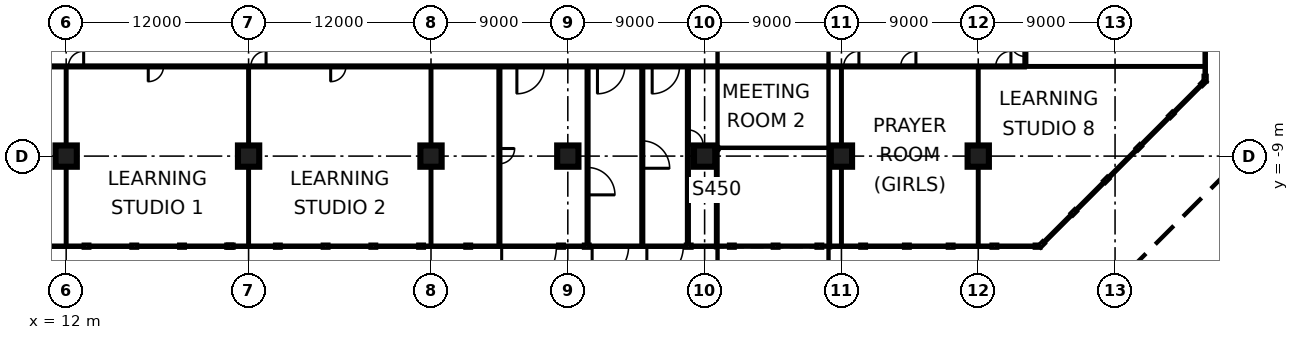
"""IFC4 building model, lengths in metres.
Left out: names, types, materials, properties, quantities, classifications, styles, units other than length and angle.
Written with IfcOpenShell. Run it as: python <this file> out.ifc"""

import sys

from ifc_helpers import new_model, si_unit, direction, frame, frame_2d, origin, origin_2d, place, context, subcontext, project, spatial, rectangle, extrude, element, fill, save


model = new_model("IFC4")
c1 = context("Model", 3, precision=1e-05, world=origin(), true_north=direction((0.0, 1.0)))
c2 = subcontext(c1, "Body", "Model", "MODEL_VIEW")
j1 = project(units=[si_unit("LENGTHUNIT", "METRE"), si_unit("PLANEANGLEUNIT", "RADIAN")], contexts=[c1])
p1 = place(None, origin())
s1 = spatial("IfcSite", under=j1, at=p1, CompositionType="ELEMENT")
p2 = place(p1, origin())
s2 = spatial("IfcBuilding", under=s1, at=p2, CompositionType="ELEMENT")
p3 = place(p2, origin())
s3 = spatial("IfcBuildingStorey", under=s2, at=p3, CompositionType="ELEMENT", Elevation=0.0)
for number, where, z_axis, x_axis in (
    (1, (12.0, -9.0, 0.0), (0.0, 0.0, 1.0), (1.0, 0.0, 0.0)),
    (2, (24.0, -9.0, 0.0), (0.0, 0.0, 1.0), (1.0, 0.0, 0.0)),
    (3, (36.0, -9.0, 0.0), (0.0, 0.0, 1.0), (1.0, 0.0, 0.0)),
    (4, (45.0, -9.0, 0.0), (0.0, 0.0, 1.0), (1.0, 0.0, 0.0)),
    (5, (54.0, -9.0, 0.0), (0.0, 0.0, 1.0), (1.0, 0.0, 0.0)),
    (6, (63.0, -9.0, 0.0), (0.0, 0.0, 1.0), (1.0, 0.0, 0.0)),
    (7, (72.0, -9.0, 0.0), (0.0, 0.0, 1.0), (1.0, 0.0, 0.0)),
):
    element("IfcColumn", number, at=place(p3, frame(where, z_axis=z_axis, x_axis=x_axis)), inside=s3, PredefinedType="COLUMN", context=c2, shape_type="SweptSolid", body=[
        extrude(rectangle(XDim=1.4, YDim=1.4, at=origin_2d()), origin(), (0.0, 0.0, 1.0), 7.2),
    ])
p4 = place(p3, frame((38.5, -14.925, 0.0), z_axis=(0.0, 0.0, 1.0), x_axis=(1.0, 0.0, 0.0)))
e8 = element("IfcWall", 8, at=p4, inside=s3, PredefinedType="SOLIDWALL", context=c2, shape_type="SweptSolid", body=[
    extrude(rectangle(XDim=6.0, YDim=0.15, at=frame_2d((3.0, 0.0))), origin(), (0.0, 0.0, 1.0), 6.8),
])
p5 = place(p4, frame((2.15, 0.0, 0.0)))
e9 = element("IfcOpeningElement", 9, at=p5, cuts=e8, PredefinedType="OPENING", context=c2, shape_type="SweptSolid", body=[
    extrude(rectangle(XDim=3.6, YDim=2.8, at=frame_2d((1.8, 1.4))), frame((0.0, 0.085, 0.0), z_axis=(0.0, -1.0, 0.0), x_axis=(1.0, 0.0, 0.0)), (0.0, 0.0, 1.0), 0.17),
])
p6 = place(p3, frame((46.3, -14.925, 0.0), z_axis=(0.0, 0.0, 1.0), x_axis=(1.0, 0.0, 0.0)))
e10 = element("IfcWall", 10, at=p6, inside=s3, PredefinedType="SOLIDWALL", context=c2, shape_type="SweptSolid", body=[
    extrude(rectangle(XDim=6.6, YDim=0.15, at=frame_2d((3.3, 0.0))), origin(), (0.0, 0.0, 1.0), 6.8),
])
p7 = place(p6, frame((0.3, 0.0, 0.0)))
e11 = element("IfcOpeningElement", 11, at=p7, cuts=e10, PredefinedType="OPENING", context=c2, shape_type="SweptSolid", body=[
    extrude(rectangle(XDim=2.4, YDim=2.4, at=frame_2d((1.2, 1.2))), frame((0.0, 0.085, 0.0), z_axis=(0.0, -1.0, 0.0), x_axis=(1.0, 0.0, 0.0)), (0.0, 0.0, 1.0), 0.17),
])
p8 = place(p6, frame((3.9, 0.0, 0.0)))
e12 = element("IfcOpeningElement", 12, at=p8, cuts=e10, PredefinedType="OPENING", context=c2, shape_type="SweptSolid", body=[
    extrude(rectangle(XDim=2.4, YDim=2.4, at=frame_2d((1.2, 1.2))), frame((0.0, 0.085, 0.0), z_axis=(0.0, -1.0, 0.0), x_axis=(1.0, 0.0, 0.0)), (0.0, 0.0, 1.0), 0.17),
])
p9 = place(p3, frame((-3.2, -3.1, 0.0), z_axis=(0.0, 0.0, 1.0), x_axis=(1.0, 0.0, 0.0)))
e13 = element("IfcWall", 13, at=p9, inside=s3, PredefinedType="PARTITIONING", context=c2, shape_type="SweptSolid", body=[
    extrude(rectangle(XDim=78.3, YDim=0.2, at=frame_2d((39.15, 0.0))), origin(), (0.0, 0.0, 1.0), 6.8),
])
p10 = place(p9, frame((70.1, 0.0, 0.0)))
e14 = element("IfcOpeningElement", 14, at=p10, cuts=e13, PredefinedType="OPENING", context=c2, shape_type="SweptSolid", body=[
    extrude(rectangle(XDim=1.0, YDim=2.1, at=frame_2d((0.5, 1.05))), frame((0.0, 0.11, 0.0), z_axis=(0.0, -1.0, 0.0), x_axis=(1.0, 0.0, 0.0)), (0.0, 0.0, 1.0), 0.22),
])
p11 = place(p9, frame((66.35, 0.0, 0.0)))
e15 = element("IfcOpeningElement", 15, at=p11, cuts=e13, PredefinedType="OPENING", context=c2, shape_type="SweptSolid", body=[
    extrude(rectangle(XDim=1.0, YDim=2.1, at=frame_2d((0.5, 1.05))), frame((0.0, 0.11, 0.0), z_axis=(0.0, -1.0, 0.0), x_axis=(1.0, 0.0, 0.0)), (0.0, 0.0, 1.0), 0.22),
])
p12 = place(p9, frame((76.35, 0.0, 0.0)))
e16 = element("IfcOpeningElement", 16, at=p12, cuts=e13, PredefinedType="OPENING", context=c2, shape_type="SweptSolid", body=[
    extrude(rectangle(XDim=1.0, YDim=2.1, at=frame_2d((0.5, 1.05))), frame((0.0, 0.11, 0.0), z_axis=(0.0, -1.0, 0.0), x_axis=(1.0, 0.0, 0.0)), (0.0, 0.0, 1.0), 0.22),
])
p13 = place(p9, frame((8.6, 0.0, 0.0)))
e17 = element("IfcOpeningElement", 17, at=p13, cuts=e13, PredefinedType="OPENING", context=c2, shape_type="SweptSolid", body=[
    extrude(rectangle(XDim=1.0, YDim=2.1, at=frame_2d((0.5, 1.05))), frame((0.0, 0.11, 0.0), z_axis=(0.0, -1.0, 0.0), x_axis=(1.0, 0.0, 0.0)), (0.0, 0.0, 1.0), 0.22),
])
p14 = place(p9, frame((3.35, 0.0, 0.0)))
e18 = element("IfcOpeningElement", 18, at=p14, cuts=e13, PredefinedType="OPENING", context=c2, shape_type="SweptSolid", body=[
    extrude(rectangle(XDim=1.0, YDim=2.1, at=frame_2d((0.5, 1.05))), frame((0.0, 0.11, 0.0), z_axis=(0.0, -1.0, 0.0), x_axis=(1.0, 0.0, 0.0)), (0.0, 0.0, 1.0), 0.22),
])
p15 = place(p9, frame((20.6, 0.0, 0.0)))
e19 = element("IfcOpeningElement", 19, at=p15, cuts=e13, PredefinedType="OPENING", context=c2, shape_type="SweptSolid", body=[
    extrude(rectangle(XDim=1.0, YDim=2.1, at=frame_2d((0.5, 1.05))), frame((0.0, 0.11, 0.0), z_axis=(0.0, -1.0, 0.0), x_axis=(1.0, 0.0, 0.0)), (0.0, 0.0, 1.0), 0.22),
])
p16 = place(p9, frame((15.35, 0.0, 0.0)))
e20 = element("IfcOpeningElement", 20, at=p16, cuts=e13, PredefinedType="OPENING", context=c2, shape_type="SweptSolid", body=[
    extrude(rectangle(XDim=1.0, YDim=2.1, at=frame_2d((0.5, 1.05))), frame((0.0, 0.11, 0.0), z_axis=(0.0, -1.0, 0.0), x_axis=(1.0, 0.0, 0.0)), (0.0, 0.0, 1.0), 0.22),
])
p17 = place(p9, frame((32.6, 0.0, 0.0)))
e21 = element("IfcOpeningElement", 21, at=p17, cuts=e13, PredefinedType="OPENING", context=c2, shape_type="SweptSolid", body=[
    extrude(rectangle(XDim=1.0, YDim=2.1, at=frame_2d((0.5, 1.05))), frame((0.0, 0.11, 0.0), z_axis=(0.0, -1.0, 0.0), x_axis=(1.0, 0.0, 0.0)), (0.0, 0.0, 1.0), 0.22),
])
p18 = place(p9, frame((27.35, 0.0, 0.0)))
e22 = element("IfcOpeningElement", 22, at=p18, cuts=e13, PredefinedType="OPENING", context=c2, shape_type="SweptSolid", body=[
    extrude(rectangle(XDim=1.0, YDim=2.1, at=frame_2d((0.5, 1.05))), frame((0.0, 0.11, 0.0), z_axis=(0.0, -1.0, 0.0), x_axis=(1.0, 0.0, 0.0)), (0.0, 0.0, 1.0), 0.22),
])
p19 = place(p9, frame((44.85, 0.0, 0.0)))
e23 = element("IfcOpeningElement", 23, at=p19, cuts=e13, PredefinedType="OPENING", context=c2, shape_type="SweptSolid", body=[
    extrude(rectangle(XDim=1.8, YDim=2.1, at=frame_2d((0.9, 1.05))), frame((0.0, 0.11, 0.0), z_axis=(0.0, -1.0, 0.0), x_axis=(1.0, 0.0, 0.0)), (0.0, 0.0, 1.0), 0.22),
])
p20 = place(p9, frame((50.15, 0.0, 0.0)))
e24 = element("IfcOpeningElement", 24, at=p20, cuts=e13, PredefinedType="OPENING", context=c2, shape_type="SweptSolid", body=[
    extrude(rectangle(XDim=1.8, YDim=2.1, at=frame_2d((0.9, 1.05))), frame((0.0, 0.11, 0.0), z_axis=(0.0, -1.0, 0.0), x_axis=(1.0, 0.0, 0.0)), (0.0, 0.0, 1.0), 0.22),
])
p21 = place(p9, frame((53.75, 0.0, 0.0)))
e25 = element("IfcOpeningElement", 25, at=p21, cuts=e13, PredefinedType="OPENING", context=c2, shape_type="SweptSolid", body=[
    extrude(rectangle(XDim=1.8, YDim=2.1, at=frame_2d((0.9, 1.05))), frame((0.0, 0.11, 0.0), z_axis=(0.0, -1.0, 0.0), x_axis=(1.0, 0.0, 0.0)), (0.0, 0.0, 1.0), 0.22),
])
for number, where, z_axis, x_axis in (
    (26, (12.0, -14.925, 0.0), (0.0, 0.0, 1.0), (0.0, 1.0, 0.0)),
    (27, (24.0, -14.925, 0.0), (0.0, 0.0, 1.0), (0.0, 1.0, 0.0)),
    (28, (36.0, -14.925, 0.0), (0.0, 0.0, 1.0), (0.0, 1.0, 0.0)),
):
    element("IfcWall", number, at=place(p3, frame(where, z_axis=z_axis, x_axis=x_axis)), inside=s3, PredefinedType="PARTITIONING", context=c2, shape_type="SweptSolid", body=[
        extrude(rectangle(XDim=11.725, YDim=0.125, at=frame_2d((5.863, 0.0))), origin(), (0.0, 0.0, 1.0), 6.8),
    ])
p22 = place(p3, frame((40.5, -14.851, 0.0), z_axis=(0.0, 0.0, 1.0), x_axis=(0.0, 1.0, 0.0)))
e29 = element("IfcWall", 29, at=p22, inside=s3, PredefinedType="PARTITIONING", context=c2, shape_type="SweptSolid", body=[
    extrude(rectangle(XDim=11.651, YDim=0.2, at=frame_2d((5.826, 0.0))), origin(), (0.0, 0.0, 1.0), 6.8),
])
p23 = place(p22, frame((5.351, 0.0, 0.0)))
e30 = element("IfcOpeningElement", 30, at=p23, cuts=e29, PredefinedType="OPENING", context=c2, shape_type="SweptSolid", body=[
    extrude(rectangle(XDim=1.0, YDim=2.1, at=frame_2d((0.5, 1.05))), frame((0.0, 0.11, 0.0), z_axis=(0.0, -1.0, 0.0), x_axis=(1.0, 0.0, 0.0)), (0.0, 0.0, 1.0), 0.22),
])
p24 = place(p3, frame((46.3, -14.925, 0.0), z_axis=(0.0, 0.0, 1.0), x_axis=(0.0, 1.0, 0.0)))
e31 = element("IfcWall", 31, at=p24, inside=s3, PredefinedType="PARTITIONING", context=c2, shape_type="SweptSolid", body=[
    extrude(rectangle(XDim=11.725, YDim=0.2, at=frame_2d((5.863, 0.0))), origin(), (0.0, 0.0, 1.0), 6.8),
])
p25 = place(p24, frame((3.375, 0.0, 0.0)))
e32 = element("IfcOpeningElement", 32, at=p25, cuts=e31, PredefinedType="OPENING", context=c2, shape_type="SweptSolid", body=[
    extrude(rectangle(XDim=1.8, YDim=2.1, at=frame_2d((0.9, 1.05))), frame((0.0, 0.11, 0.0), z_axis=(0.0, -1.0, 0.0), x_axis=(1.0, 0.0, 0.0)), (0.0, 0.0, 1.0), 0.22),
])
p26 = place(p3, frame((49.9, -14.851, 0.0), z_axis=(0.0, 0.0, 1.0), x_axis=(0.0, 1.0, 0.0)))
e33 = element("IfcWall", 33, at=p26, inside=s3, PredefinedType="PARTITIONING", context=c2, shape_type="SweptSolid", body=[
    extrude(rectangle(XDim=11.651, YDim=0.2, at=frame_2d((5.826, 0.0))), origin(), (0.0, 0.0, 1.0), 6.8),
])
p27 = place(p26, frame((5.051, 0.0, 0.0)))
e34 = element("IfcOpeningElement", 34, at=p27, cuts=e33, PredefinedType="OPENING", context=c2, shape_type="SweptSolid", body=[
    extrude(rectangle(XDim=1.8, YDim=2.1, at=frame_2d((0.9, 1.05))), frame((0.0, 0.11, 0.0), z_axis=(0.0, -1.0, 0.0), x_axis=(1.0, 0.0, 0.0)), (0.0, 0.0, 1.0), 0.22),
])
p28 = place(p3, frame((52.9, -14.925, 0.0), z_axis=(0.0, 0.0, 1.0), x_axis=(0.0, 1.0, 0.0)))
e35 = element("IfcWall", 35, at=p28, inside=s3, PredefinedType="PARTITIONING", context=c2, shape_type="SweptSolid", body=[
    extrude(rectangle(XDim=11.725, YDim=0.2, at=frame_2d((5.863, 0.0))), origin(), (0.0, 0.0, 1.0), 6.8),
])
p29 = place(p28, frame((6.65, 0.0, 0.0)))
e36 = element("IfcOpeningElement", 36, at=p29, cuts=e35, PredefinedType="OPENING", context=c2, shape_type="SweptSolid", body=[
    extrude(rectangle(XDim=1.0, YDim=2.1, at=frame_2d((0.5, 1.05))), frame((0.0, 0.11, 0.0), z_axis=(0.0, -1.0, 0.0), x_axis=(1.0, 0.0, 0.0)), (0.0, 0.0, 1.0), 0.22),
])
for number, where, z_axis, x_axis in (
    (37, (63.0, -14.925, 0.0), (0.0, 0.0, 1.0), (0.0, 1.0, 0.0)),
    (38, (72.0, -14.925, 0.0), (0.0, 0.0, 1.0), (0.0, 1.0, 0.0)),
):
    element("IfcWall", number, at=place(p3, frame(where, z_axis=z_axis, x_axis=x_axis)), inside=s3, PredefinedType="PARTITIONING", context=c2, shape_type="SweptSolid", body=[
        extrude(rectangle(XDim=11.725, YDim=0.125, at=frame_2d((5.863, 0.0))), origin(), (0.0, 0.0, 1.0), 6.8),
    ])
p30 = place(p3, frame((75.1, -3.1, 0.0), z_axis=(0.0, 0.0, 1.0), x_axis=(1.0, 0.0, 0.0)))
e39 = element("IfcWall", 39, at=p30, inside=s3, PredefinedType="PARTITIONING", context=c2, shape_type="SweptSolid", body=[
    extrude(rectangle(XDim=11.825, YDim=0.125, at=frame_2d((5.913, 0.0))), origin(), (0.0, 0.0, 1.0), 6.8),
])
p31 = place(p3, frame((75.1, -3.0, 0.0), z_axis=(0.0, 0.0, 1.0), x_axis=(0.0, 1.0, 0.0)))
e40 = element("IfcWall", 40, at=p31, inside=s3, PredefinedType="PARTITIONING", context=c2, shape_type="SweptSolid", body=[
    extrude(rectangle(XDim=30.0, YDim=0.2, at=frame_2d((15.0, 0.0))), origin(), (0.0, 0.0, 1.0), 6.8),
])
p32 = place(p31, frame((0.55, 0.0, 0.0)))
e41 = element("IfcOpeningElement", 41, at=p32, cuts=e40, PredefinedType="OPENING", context=c2, shape_type="SweptSolid", body=[
    extrude(rectangle(XDim=1.0, YDim=2.1, at=frame_2d((0.5, 1.05))), frame((0.0, 0.11, 0.0), z_axis=(0.0, -1.0, 0.0), x_axis=(1.0, 0.0, 0.0)), (0.0, 0.0, 1.0), 0.22),
])
p33 = place(p31, frame((8.4, 0.0, 0.0)))
e42 = element("IfcOpeningElement", 42, at=p33, cuts=e40, PredefinedType="OPENING", context=c2, shape_type="SweptSolid", body=[
    extrude(rectangle(XDim=1.0, YDim=2.1, at=frame_2d((0.5, 1.05))), frame((0.0, 0.11, 0.0), z_axis=(0.0, -1.0, 0.0), x_axis=(1.0, 0.0, 0.0)), (0.0, 0.0, 1.0), 0.22),
])
p34 = place(p31, frame((22.25, 0.0, 0.0)))
e43 = element("IfcOpeningElement", 43, at=p34, cuts=e40, PredefinedType="OPENING", context=c2, shape_type="SweptSolid", body=[
    extrude(rectangle(XDim=1.0, YDim=2.1, at=frame_2d((0.5, 1.05))), frame((0.0, 0.11, 0.0), z_axis=(0.0, -1.0, 0.0), x_axis=(1.0, 0.0, 0.0)), (0.0, 0.0, 1.0), 0.22),
])
p35 = place(p31, frame((28.35, 0.0, 0.0)))
e44 = element("IfcOpeningElement", 44, at=p35, cuts=e40, PredefinedType="OPENING", context=c2, shape_type="SweptSolid", body=[
    extrude(rectangle(XDim=1.0, YDim=2.1, at=frame_2d((0.5, 1.05))), frame((0.0, 0.11, 0.0), z_axis=(0.0, -1.0, 0.0), x_axis=(1.0, 0.0, 0.0)), (0.0, 0.0, 1.0), 0.22),
])
p36 = place(p31, frame((16.25, 0.0, 0.0)))
e45 = element("IfcOpeningElement", 45, at=p36, cuts=e40, PredefinedType="OPENING", context=c2, shape_type="SweptSolid", body=[
    extrude(rectangle(XDim=1.8, YDim=2.1, at=frame_2d((0.9, 1.05))), frame((0.0, 0.11, 0.0), z_axis=(0.0, -1.0, 0.0), x_axis=(1.0, 0.0, 0.0)), (0.0, 0.0, 1.0), 0.22),
])
p37 = place(p5, frame((3.6, 0.0, 0.0), z_axis=(0.0, 0.0, 1.0), x_axis=(-1.0, 0.0, 0.0)))
e46 = element("IfcDoor", 46, at=p37, inside=s3, OperationType="DOUBLE_DOOR_SINGLE_SWING", PredefinedType="DOOR", context=c2, shape_type="SweptSolid", body=[
    extrude(rectangle(XDim=3.6, YDim=2.8, at=frame_2d((1.8, 1.4))), frame((0.0, 0.025, 0.0), z_axis=(0.0, -1.0, 0.0), x_axis=(1.0, 0.0, 0.0)), (0.0, 0.0, 1.0), 0.05),
])
fill(e9, e46)
p38 = place(p7, frame((2.4, 0.0, 0.0), z_axis=(0.0, 0.0, 1.0), x_axis=(-1.0, 0.0, 0.0)))
e47 = element("IfcDoor", 47, at=p38, inside=s3, OperationType="DOUBLE_DOOR_SINGLE_SWING", PredefinedType="DOOR", context=c2, shape_type="SweptSolid", body=[
    extrude(rectangle(XDim=2.4, YDim=2.4, at=frame_2d((1.2, 1.2))), frame((0.0, 0.025, 0.0), z_axis=(0.0, -1.0, 0.0), x_axis=(1.0, 0.0, 0.0)), (0.0, 0.0, 1.0), 0.05),
])
fill(e11, e47)
p39 = place(p8, frame((2.4, 0.0, 0.0), z_axis=(0.0, 0.0, 1.0), x_axis=(-1.0, 0.0, 0.0)))
e48 = element("IfcDoor", 48, at=p39, inside=s3, OperationType="DOUBLE_DOOR_SINGLE_SWING", PredefinedType="DOOR", context=c2, shape_type="SweptSolid", body=[
    extrude(rectangle(XDim=2.4, YDim=2.4, at=frame_2d((1.2, 1.2))), frame((0.0, 0.025, 0.0), z_axis=(0.0, -1.0, 0.0), x_axis=(1.0, 0.0, 0.0)), (0.0, 0.0, 1.0), 0.05),
])
fill(e12, e48)
p40 = place(p32, frame((1.0, 0.0, 0.0), z_axis=(0.0, 0.0, 1.0), x_axis=(-1.0, 0.0, 0.0)))
e49 = element("IfcDoor", 49, at=p40, inside=s3, OperationType="SINGLE_SWING_RIGHT", PredefinedType="DOOR", context=c2, shape_type="SweptSolid", body=[
    extrude(rectangle(XDim=1.0, YDim=2.1, at=frame_2d((0.5, 1.05))), frame((0.0, 0.025, 0.0), z_axis=(0.0, -1.0, 0.0), x_axis=(1.0, 0.0, 0.0)), (0.0, 0.0, 1.0), 0.05),
])
fill(e41, e49)
p41 = place(p29, frame((1.0, 0.0, 0.0), z_axis=(0.0, 0.0, 1.0), x_axis=(-1.0, 0.0, 0.0)))
e50 = element("IfcDoor", 50, at=p41, inside=s3, OperationType="SINGLE_SWING_LEFT", PredefinedType="DOOR", context=c2, shape_type="SweptSolid", body=[
    extrude(rectangle(XDim=1.0, YDim=2.1, at=frame_2d((0.5, 1.05))), frame((0.0, 0.025, 0.0), z_axis=(0.0, -1.0, 0.0), x_axis=(1.0, 0.0, 0.0)), (0.0, 0.0, 1.0), 0.05),
])
fill(e36, e50)
p42 = place(p10, frame((1.0, 0.0, 0.0), z_axis=(0.0, 0.0, 1.0), x_axis=(-1.0, 0.0, 0.0)))
e51 = element("IfcDoor", 51, at=p42, inside=s3, OperationType="SINGLE_SWING_RIGHT", PredefinedType="DOOR", context=c2, shape_type="SweptSolid", body=[
    extrude(rectangle(XDim=1.0, YDim=2.1, at=frame_2d((0.5, 1.05))), frame((0.0, 0.025, 0.0), z_axis=(0.0, -1.0, 0.0), x_axis=(1.0, 0.0, 0.0)), (0.0, 0.0, 1.0), 0.05),
])
fill(e14, e51)
p43 = place(p11, frame((1.0, 0.0, 0.0), z_axis=(0.0, 0.0, 1.0), x_axis=(-1.0, 0.0, 0.0)))
e52 = element("IfcDoor", 52, at=p43, inside=s3, OperationType="SINGLE_SWING_RIGHT", PredefinedType="DOOR", context=c2, shape_type="SweptSolid", body=[
    extrude(rectangle(XDim=1.0, YDim=2.1, at=frame_2d((0.5, 1.05))), frame((0.0, 0.025, 0.0), z_axis=(0.0, -1.0, 0.0), x_axis=(1.0, 0.0, 0.0)), (0.0, 0.0, 1.0), 0.05),
])
fill(e15, e52)
p44 = place(p12, frame((1.0, 0.0, 0.0), z_axis=(0.0, 0.0, 1.0), x_axis=(-1.0, 0.0, 0.0)))
e53 = element("IfcDoor", 53, at=p44, inside=s3, OperationType="SINGLE_SWING_RIGHT", PredefinedType="DOOR", context=c2, shape_type="SweptSolid", body=[
    extrude(rectangle(XDim=1.0, YDim=2.1, at=frame_2d((0.5, 1.05))), frame((0.0, 0.025, 0.0), z_axis=(0.0, -1.0, 0.0), x_axis=(1.0, 0.0, 0.0)), (0.0, 0.0, 1.0), 0.05),
])
fill(e16, e53)
p45 = place(p15, frame((1.0, 0.0, 0.0), z_axis=(0.0, 0.0, 1.0), x_axis=(-1.0, 0.0, 0.0)))
e54 = element("IfcDoor", 54, at=p45, inside=s3, OperationType="SINGLE_SWING_LEFT", PredefinedType="DOOR", context=c2, shape_type="SweptSolid", body=[
    extrude(rectangle(XDim=1.0, YDim=2.1, at=frame_2d((0.5, 1.05))), frame((0.0, 0.025, 0.0), z_axis=(0.0, -1.0, 0.0), x_axis=(1.0, 0.0, 0.0)), (0.0, 0.0, 1.0), 0.05),
])
fill(e19, e54)
p46 = place(p16, frame((1.0, 0.0, 0.0), z_axis=(0.0, 0.0, 1.0), x_axis=(-1.0, 0.0, 0.0)))
e55 = element("IfcDoor", 55, at=p46, inside=s3, OperationType="SINGLE_SWING_RIGHT", PredefinedType="DOOR", context=c2, shape_type="SweptSolid", body=[
    extrude(rectangle(XDim=1.0, YDim=2.1, at=frame_2d((0.5, 1.05))), frame((0.0, 0.025, 0.0), z_axis=(0.0, -1.0, 0.0), x_axis=(1.0, 0.0, 0.0)), (0.0, 0.0, 1.0), 0.05),
])
fill(e20, e55)
p47 = place(p17, frame((1.0, 0.0, 0.0), z_axis=(0.0, 0.0, 1.0), x_axis=(-1.0, 0.0, 0.0)))
e56 = element("IfcDoor", 56, at=p47, inside=s3, OperationType="SINGLE_SWING_LEFT", PredefinedType="DOOR", context=c2, shape_type="SweptSolid", body=[
    extrude(rectangle(XDim=1.0, YDim=2.1, at=frame_2d((0.5, 1.05))), frame((0.0, 0.025, 0.0), z_axis=(0.0, -1.0, 0.0), x_axis=(1.0, 0.0, 0.0)), (0.0, 0.0, 1.0), 0.05),
])
fill(e21, e56)
p48 = place(p18, frame((1.0, 0.0, 0.0), z_axis=(0.0, 0.0, 1.0), x_axis=(-1.0, 0.0, 0.0)))
e57 = element("IfcDoor", 57, at=p48, inside=s3, OperationType="SINGLE_SWING_RIGHT", PredefinedType="DOOR", context=c2, shape_type="SweptSolid", body=[
    extrude(rectangle(XDim=1.0, YDim=2.1, at=frame_2d((0.5, 1.05))), frame((0.0, 0.025, 0.0), z_axis=(0.0, -1.0, 0.0), x_axis=(1.0, 0.0, 0.0)), (0.0, 0.0, 1.0), 0.05),
])
fill(e22, e57)
p49 = place(p23, origin())
e58 = element("IfcDoor", 58, at=p49, inside=s3, OperationType="SINGLE_SWING_RIGHT", PredefinedType="DOOR", context=c2, shape_type="SweptSolid", body=[
    extrude(rectangle(XDim=1.0, YDim=2.1, at=frame_2d((0.5, 1.05))), frame((0.0, 0.025, 0.0), z_axis=(0.0, -1.0, 0.0), x_axis=(1.0, 0.0, 0.0)), (0.0, 0.0, 1.0), 0.05),
])
fill(e30, e58)
p50 = place(p25, frame((1.8, 0.0, 0.0), z_axis=(0.0, 0.0, 1.0), x_axis=(-1.0, 0.0, 0.0)))
e59 = element("IfcDoor", 59, at=p50, inside=s3, OperationType="DOUBLE_DOOR_SINGLE_SWING", PredefinedType="DOOR", context=c2, shape_type="SweptSolid", body=[
    extrude(rectangle(XDim=1.8, YDim=2.1, at=frame_2d((0.9, 1.05))), frame((0.0, 0.025, 0.0), z_axis=(0.0, -1.0, 0.0), x_axis=(1.0, 0.0, 0.0)), (0.0, 0.0, 1.0), 0.05),
])
fill(e32, e59)
p51 = place(p19, frame((1.8, 0.0, 0.0), z_axis=(0.0, 0.0, 1.0), x_axis=(-1.0, 0.0, 0.0)))
e60 = element("IfcDoor", 60, at=p51, inside=s3, OperationType="DOUBLE_DOOR_SINGLE_SWING", PredefinedType="DOOR", context=c2, shape_type="SweptSolid", body=[
    extrude(rectangle(XDim=1.8, YDim=2.1, at=frame_2d((0.9, 1.05))), frame((0.0, 0.025, 0.0), z_axis=(0.0, -1.0, 0.0), x_axis=(1.0, 0.0, 0.0)), (0.0, 0.0, 1.0), 0.05),
])
fill(e23, e60)
p52 = place(p27, frame((1.8, 0.0, 0.0), z_axis=(0.0, 0.0, 1.0), x_axis=(-1.0, 0.0, 0.0)))
e61 = element("IfcDoor", 61, at=p52, inside=s3, OperationType="DOUBLE_DOOR_SINGLE_SWING", PredefinedType="DOOR", context=c2, shape_type="SweptSolid", body=[
    extrude(rectangle(XDim=1.8, YDim=2.1, at=frame_2d((0.9, 1.05))), frame((0.0, 0.025, 0.0), z_axis=(0.0, -1.0, 0.0), x_axis=(1.0, 0.0, 0.0)), (0.0, 0.0, 1.0), 0.05),
])
fill(e34, e61)
p53 = place(p20, frame((1.8, 0.0, 0.0), z_axis=(0.0, 0.0, 1.0), x_axis=(-1.0, 0.0, 0.0)))
e62 = element("IfcDoor", 62, at=p53, inside=s3, OperationType="DOUBLE_DOOR_SINGLE_SWING", PredefinedType="DOOR", context=c2, shape_type="SweptSolid", body=[
    extrude(rectangle(XDim=1.8, YDim=2.1, at=frame_2d((0.9, 1.05))), frame((0.0, 0.025, 0.0), z_axis=(0.0, -1.0, 0.0), x_axis=(1.0, 0.0, 0.0)), (0.0, 0.0, 1.0), 0.05),
])
fill(e24, e62)
p54 = place(p21, frame((1.8, 0.0, 0.0), z_axis=(0.0, 0.0, 1.0), x_axis=(-1.0, 0.0, 0.0)))
e63 = element("IfcDoor", 63, at=p54, inside=s3, OperationType="DOUBLE_DOOR_SINGLE_SWING", PredefinedType="DOOR", context=c2, shape_type="SweptSolid", body=[
    extrude(rectangle(XDim=1.8, YDim=2.1, at=frame_2d((0.9, 1.05))), frame((0.0, 0.025, 0.0), z_axis=(0.0, -1.0, 0.0), x_axis=(1.0, 0.0, 0.0)), (0.0, 0.0, 1.0), 0.05),
])
fill(e25, e63)
save(model, sys.argv[1])
